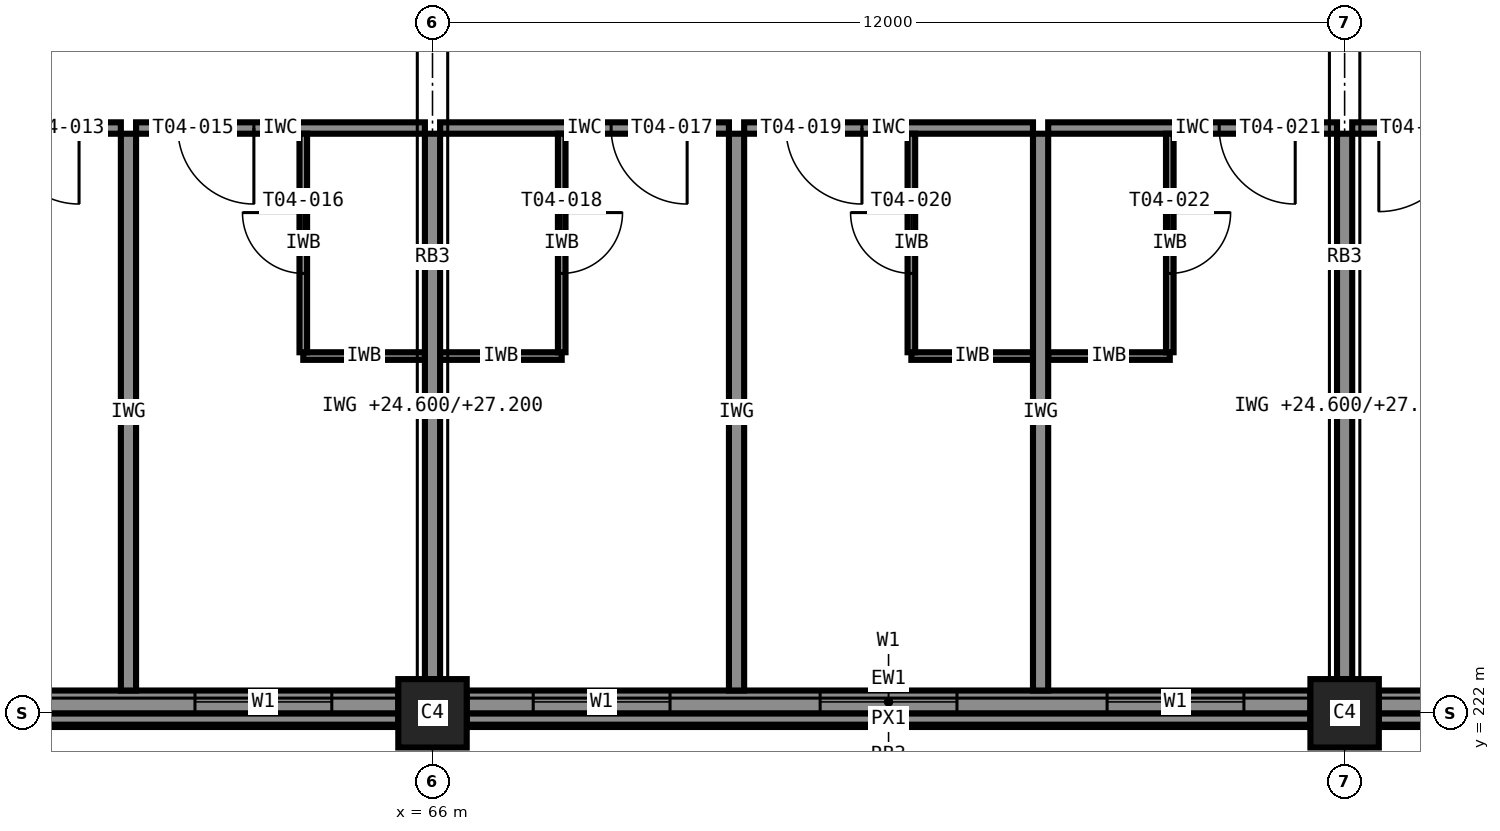
"""IFC4 building model, lengths in metres.
Left out: names, types, materials, properties, quantities, classifications, styles, units other than length and angle.
Written with IfcOpenShell. Run it as: python <this file> out.ifc"""

import sys

from ifc_helpers import new_model, si_unit, direction, frame, frame_2d, origin, origin_2d, place, context, subcontext, project, spatial, rectangle, extrude, element, fill, save


model = new_model("IFC4")
c1 = context("Model", 3, precision=1e-05, world=origin(), true_north=direction((0.0, 1.0)))
c2 = subcontext(c1, "Body", "Model", "MODEL_VIEW")
j1 = project(units=[si_unit("LENGTHUNIT", "METRE"), si_unit("PLANEANGLEUNIT", "RADIAN")], contexts=[c1])
p1 = place(None, origin())
s1 = spatial("IfcSite", under=j1, at=p1, CompositionType="ELEMENT")
p2 = place(p1, origin())
s2 = spatial("IfcBuilding", under=s1, at=p2, CompositionType="ELEMENT")
p3 = place(p2, frame((0.0, 0.0, 24.6)))
s3 = spatial("IfcBuildingStorey", under=s2, at=p3, CompositionType="ELEMENT", Elevation=24.6)
for number, where, z_axis, x_axis in (
    (1, (66.0, 222.0, 0.0), (0.0, 0.0, 1.0), (1.0, 0.0, 0.0)),
    (2, (78.0, 222.0, 0.0), (0.0, 0.0, 1.0), (1.0, 0.0, 0.0)),
):
    element("IfcColumn", number, at=place(p3, frame(where, z_axis=z_axis, x_axis=x_axis)), inside=s3, PredefinedType="COLUMN", context=c2, shape_type="SweptSolid", body=[
        extrude(rectangle(XDim=0.9, YDim=0.9, at=origin_2d()), origin(), (0.0, 0.0, 1.0), 3.6),
    ])
p4 = place(p3, frame((54.45, 222.15, 0.0), z_axis=(0.0, 0.0, 1.0), x_axis=(1.0, 0.0, 0.0)))
e3 = element("IfcWall", 3, at=p4, inside=s3, PredefinedType="STANDARD", context=c2, shape_type="SweptSolid", body=[
    extrude(rectangle(XDim=11.1, YDim=0.3, at=frame_2d((5.55, 0.0))), origin(), (0.0, 0.0, 1.0), 2.6),
])
p5 = place(p4, frame((0.875, 0.0, 0.85)))
e4 = element("IfcOpeningElement", 4, at=p5, cuts=e3, PredefinedType="OPENING", context=c2, shape_type="SweptSolid", body=[
    extrude(rectangle(XDim=1.8, YDim=1.75, at=frame_2d((0.9, 0.875))), frame((0.0, 0.16, 0.0), z_axis=(0.0, -1.0, 0.0), x_axis=(1.0, 0.0, 0.0)), (0.0, 0.0, 1.0), 0.32),
])
p6 = place(p4, frame((4.65, 0.0, 0.85)))
e5 = element("IfcOpeningElement", 5, at=p6, cuts=e3, PredefinedType="OPENING", context=c2, shape_type="SweptSolid", body=[
    extrude(rectangle(XDim=1.8, YDim=1.75, at=frame_2d((0.9, 0.875))), frame((0.0, 0.16, 0.0), z_axis=(0.0, -1.0, 0.0), x_axis=(1.0, 0.0, 0.0)), (0.0, 0.0, 1.0), 0.32),
])
p7 = place(p4, frame((8.425, 0.0, 0.85)))
e6 = element("IfcOpeningElement", 6, at=p7, cuts=e3, PredefinedType="OPENING", context=c2, shape_type="SweptSolid", body=[
    extrude(rectangle(XDim=1.8, YDim=1.75, at=frame_2d((0.9, 0.875))), frame((0.0, 0.16, 0.0), z_axis=(0.0, -1.0, 0.0), x_axis=(1.0, 0.0, 0.0)), (0.0, 0.0, 1.0), 0.32),
])
p8 = place(p3, frame((66.45, 222.15, 0.0), z_axis=(0.0, 0.0, 1.0), x_axis=(1.0, 0.0, 0.0)))
e7 = element("IfcWall", 7, at=p8, inside=s3, PredefinedType="STANDARD", context=c2, shape_type="SweptSolid", body=[
    extrude(rectangle(XDim=11.1, YDim=0.3, at=frame_2d((5.55, 0.0))), origin(), (0.0, 0.0, 1.0), 2.6),
])
p9 = place(p8, frame((0.875, 0.0, 0.85)))
e8 = element("IfcOpeningElement", 8, at=p9, cuts=e7, PredefinedType="OPENING", context=c2, shape_type="SweptSolid", body=[
    extrude(rectangle(XDim=1.8, YDim=1.75, at=frame_2d((0.9, 0.875))), frame((0.0, 0.16, 0.0), z_axis=(0.0, -1.0, 0.0), x_axis=(1.0, 0.0, 0.0)), (0.0, 0.0, 1.0), 0.32),
])
p10 = place(p8, frame((4.65, 0.0, 0.85)))
e9 = element("IfcOpeningElement", 9, at=p10, cuts=e7, PredefinedType="OPENING", context=c2, shape_type="SweptSolid", body=[
    extrude(rectangle(XDim=1.8, YDim=1.75, at=frame_2d((0.9, 0.875))), frame((0.0, 0.16, 0.0), z_axis=(0.0, -1.0, 0.0), x_axis=(1.0, 0.0, 0.0)), (0.0, 0.0, 1.0), 0.32),
])
p11 = place(p8, frame((8.425, 0.0, 0.85)))
e10 = element("IfcOpeningElement", 10, at=p11, cuts=e7, PredefinedType="OPENING", context=c2, shape_type="SweptSolid", body=[
    extrude(rectangle(XDim=1.8, YDim=1.75, at=frame_2d((0.9, 0.875))), frame((0.0, 0.16, 0.0), z_axis=(0.0, -1.0, 0.0), x_axis=(1.0, 0.0, 0.0)), (0.0, 0.0, 1.0), 0.32),
])
p12 = place(p3, frame((78.45, 222.15, 0.0), z_axis=(0.0, 0.0, 1.0), x_axis=(1.0, 0.0, 0.0)))
e11 = element("IfcWall", 11, at=p12, inside=s3, PredefinedType="STANDARD", context=c2, shape_type="SweptSolid", body=[
    extrude(rectangle(XDim=11.1, YDim=0.3, at=frame_2d((5.55, 0.0))), origin(), (0.0, 0.0, 1.0), 2.6),
])
p13 = place(p12, frame((1.075, 0.0, 0.85)))
e12 = element("IfcOpeningElement", 12, at=p13, cuts=e11, PredefinedType="OPENING", context=c2, shape_type="SweptSolid", body=[
    extrude(rectangle(XDim=1.8, YDim=1.75, at=frame_2d((0.9, 0.875))), frame((0.0, 0.16, 0.0), z_axis=(0.0, -1.0, 0.0), x_axis=(1.0, 0.0, 0.0)), (0.0, 0.0, 1.0), 0.32),
])
p14 = place(p12, frame((4.85, 0.0, 0.85)))
e13 = element("IfcOpeningElement", 13, at=p14, cuts=e11, PredefinedType="OPENING", context=c2, shape_type="SweptSolid", body=[
    extrude(rectangle(XDim=1.8, YDim=1.75, at=frame_2d((0.9, 0.875))), frame((0.0, 0.16, 0.0), z_axis=(0.0, -1.0, 0.0), x_axis=(1.0, 0.0, 0.0)), (0.0, 0.0, 1.0), 0.32),
])
for number, where, z_axis, x_axis in (
    (14, (54.45, 221.925, 3.4), (0.0, 0.0, 1.0), (1.0, 0.0, 0.0)),
    (15, (66.45, 221.925, 3.4), (0.0, 0.0, 1.0), (1.0, 0.0, 0.0)),
    (16, (78.45, 221.925, 3.4), (0.0, 0.0, 1.0), (1.0, 0.0, 0.0)),
):
    element("IfcWall", number, at=place(p3, frame(where, z_axis=z_axis, x_axis=x_axis)), inside=s3, PredefinedType="STANDARD", context=c2, shape_type="SweptSolid", body=[
        extrude(rectangle(XDim=11.1, YDim=0.15, at=frame_2d((5.55, 0.0))), origin(), (0.0, 0.0, 1.0), 0.2),
    ])
p15 = place(p3, frame((61.9, 229.7, 0.0), z_axis=(0.0, 0.0, 1.0), x_axis=(-1.0, 0.0, 0.0)))
e17 = element("IfcWall", 17, at=p15, inside=s3, PredefinedType="PARTITIONING", context=c2, shape_type="SweptSolid", body=[
    extrude(rectangle(XDim=3.8, YDim=0.15, at=frame_2d((1.9, 0.0))), origin(), (0.0, 0.0, 1.0), 3.4),
])
p16 = place(p15, frame((0.55, 0.0, 0.0)))
e18 = element("IfcOpeningElement", 18, at=p16, cuts=e17, PredefinedType="OPENING", context=c2, shape_type="SweptSolid", body=[
    extrude(rectangle(XDim=1.0, YDim=2.1, at=frame_2d((0.5, 1.05))), frame((0.0, 0.085, 0.0), z_axis=(0.0, -1.0, 0.0), x_axis=(1.0, 0.0, 0.0)), (0.0, 0.0, 1.0), 0.17),
])
p17 = place(p3, frame((65.9, 229.7, 0.0), z_axis=(0.0, 0.0, 1.0), x_axis=(-1.0, 0.0, 0.0)))
e19 = element("IfcWall", 19, at=p17, inside=s3, PredefinedType="PARTITIONING", context=c2, shape_type="SweptSolid", body=[
    extrude(rectangle(XDim=3.8, YDim=0.15, at=frame_2d((1.9, 0.0))), origin(), (0.0, 0.0, 1.0), 3.4),
])
p18 = place(p17, frame((2.25, 0.0, 0.0)))
e20 = element("IfcOpeningElement", 20, at=p18, cuts=e19, PredefinedType="OPENING", context=c2, shape_type="SweptSolid", body=[
    extrude(rectangle(XDim=1.0, YDim=2.1, at=frame_2d((0.5, 1.05))), frame((0.0, 0.085, 0.0), z_axis=(0.0, -1.0, 0.0), x_axis=(1.0, 0.0, 0.0)), (0.0, 0.0, 1.0), 0.17),
])
p19 = place(p3, frame((64.3, 226.7, 0.0), z_axis=(0.0, 0.0, 1.0), x_axis=(1.0, 0.0, 0.0)))
e21 = element("IfcWall", 21, at=p19, inside=s3, PredefinedType="PARTITIONING", context=c2, shape_type="SweptSolid", body=[
    extrude(rectangle(XDim=1.6, YDim=0.1, at=frame_2d((0.8, 0.0))), origin(), (0.0, 0.0, 1.0), 3.4),
])
p20 = place(p3, frame((64.3, 226.75, 0.0), z_axis=(0.0, 0.0, 1.0), x_axis=(0.0, 1.0, 0.0)))
e22 = element("IfcWall", 22, at=p20, inside=s3, PredefinedType="PARTITIONING", context=c2, shape_type="SweptSolid", body=[
    extrude(rectangle(XDim=2.875, YDim=0.1, at=frame_2d((1.438, 0.0))), origin(), (0.0, 0.0, 1.0), 3.4),
])
p21 = place(p20, frame((1.038, 0.0, 0.0)))
e23 = element("IfcOpeningElement", 23, at=p21, cuts=e22, PredefinedType="OPENING", context=c2, shape_type="SweptSolid", body=[
    extrude(rectangle(XDim=0.8, YDim=2.1, at=frame_2d((0.4, 1.05))), frame((0.0, 0.06, 0.0), z_axis=(0.0, -1.0, 0.0), x_axis=(1.0, 0.0, 0.0)), (0.0, 0.0, 1.0), 0.12),
])
p22 = place(p3, frame((69.9, 229.7, 0.0), z_axis=(0.0, 0.0, 1.0), x_axis=(-1.0, 0.0, 0.0)))
e24 = element("IfcWall", 24, at=p22, inside=s3, PredefinedType="PARTITIONING", context=c2, shape_type="SweptSolid", body=[
    extrude(rectangle(XDim=3.8, YDim=0.15, at=frame_2d((1.9, 0.0))), origin(), (0.0, 0.0, 1.0), 3.4),
])
p23 = place(p22, frame((0.55, 0.0, 0.0)))
e25 = element("IfcOpeningElement", 25, at=p23, cuts=e24, PredefinedType="OPENING", context=c2, shape_type="SweptSolid", body=[
    extrude(rectangle(XDim=1.0, YDim=2.1, at=frame_2d((0.5, 1.05))), frame((0.0, 0.085, 0.0), z_axis=(0.0, -1.0, 0.0), x_axis=(1.0, 0.0, 0.0)), (0.0, 0.0, 1.0), 0.17),
])
p24 = place(p3, frame((66.1, 226.7, 0.0), z_axis=(0.0, 0.0, 1.0), x_axis=(1.0, 0.0, 0.0)))
e26 = element("IfcWall", 26, at=p24, inside=s3, PredefinedType="PARTITIONING", context=c2, shape_type="SweptSolid", body=[
    extrude(rectangle(XDim=1.6, YDim=0.1, at=frame_2d((0.8, 0.0))), origin(), (0.0, 0.0, 1.0), 3.4),
])
p25 = place(p3, frame((67.7, 229.625, 0.0), z_axis=(0.0, 0.0, 1.0), x_axis=(0.0, -1.0, 0.0)))
e27 = element("IfcWall", 27, at=p25, inside=s3, PredefinedType="PARTITIONING", context=c2, shape_type="SweptSolid", body=[
    extrude(rectangle(XDim=2.875, YDim=0.1, at=frame_2d((1.438, 0.0))), origin(), (0.0, 0.0, 1.0), 3.4),
])
p26 = place(p25, frame((1.038, 0.0, 0.0)))
e28 = element("IfcOpeningElement", 28, at=p26, cuts=e27, PredefinedType="OPENING", context=c2, shape_type="SweptSolid", body=[
    extrude(rectangle(XDim=0.8, YDim=2.1, at=frame_2d((0.4, 1.05))), frame((0.0, 0.06, 0.0), z_axis=(0.0, -1.0, 0.0), x_axis=(1.0, 0.0, 0.0)), (0.0, 0.0, 1.0), 0.12),
])
p27 = place(p3, frame((73.9, 229.7, 0.0), z_axis=(0.0, 0.0, 1.0), x_axis=(-1.0, 0.0, 0.0)))
e29 = element("IfcWall", 29, at=p27, inside=s3, PredefinedType="PARTITIONING", context=c2, shape_type="SweptSolid", body=[
    extrude(rectangle(XDim=3.8, YDim=0.15, at=frame_2d((1.9, 0.0))), origin(), (0.0, 0.0, 1.0), 3.4),
])
p28 = place(p27, frame((2.25, 0.0, 0.0)))
e30 = element("IfcOpeningElement", 30, at=p28, cuts=e29, PredefinedType="OPENING", context=c2, shape_type="SweptSolid", body=[
    extrude(rectangle(XDim=1.0, YDim=2.1, at=frame_2d((0.5, 1.05))), frame((0.0, 0.085, 0.0), z_axis=(0.0, -1.0, 0.0), x_axis=(1.0, 0.0, 0.0)), (0.0, 0.0, 1.0), 0.17),
])
p29 = place(p3, frame((72.3, 226.7, 0.0), z_axis=(0.0, 0.0, 1.0), x_axis=(1.0, 0.0, 0.0)))
e31 = element("IfcWall", 31, at=p29, inside=s3, PredefinedType="PARTITIONING", context=c2, shape_type="SweptSolid", body=[
    extrude(rectangle(XDim=1.6, YDim=0.1, at=frame_2d((0.8, 0.0))), origin(), (0.0, 0.0, 1.0), 3.4),
])
p30 = place(p3, frame((72.3, 226.75, 0.0), z_axis=(0.0, 0.0, 1.0), x_axis=(0.0, 1.0, 0.0)))
e32 = element("IfcWall", 32, at=p30, inside=s3, PredefinedType="PARTITIONING", context=c2, shape_type="SweptSolid", body=[
    extrude(rectangle(XDim=2.875, YDim=0.1, at=frame_2d((1.438, 0.0))), origin(), (0.0, 0.0, 1.0), 3.4),
])
p31 = place(p30, frame((1.038, 0.0, 0.0)))
e33 = element("IfcOpeningElement", 33, at=p31, cuts=e32, PredefinedType="OPENING", context=c2, shape_type="SweptSolid", body=[
    extrude(rectangle(XDim=0.8, YDim=2.1, at=frame_2d((0.4, 1.05))), frame((0.0, 0.06, 0.0), z_axis=(0.0, -1.0, 0.0), x_axis=(1.0, 0.0, 0.0)), (0.0, 0.0, 1.0), 0.12),
])
p32 = place(p3, frame((77.9, 229.7, 0.0), z_axis=(0.0, 0.0, 1.0), x_axis=(-1.0, 0.0, 0.0)))
e34 = element("IfcWall", 34, at=p32, inside=s3, PredefinedType="PARTITIONING", context=c2, shape_type="SweptSolid", body=[
    extrude(rectangle(XDim=3.8, YDim=0.15, at=frame_2d((1.9, 0.0))), origin(), (0.0, 0.0, 1.0), 3.4),
])
p33 = place(p32, frame((0.55, 0.0, 0.0)))
e35 = element("IfcOpeningElement", 35, at=p33, cuts=e34, PredefinedType="OPENING", context=c2, shape_type="SweptSolid", body=[
    extrude(rectangle(XDim=1.0, YDim=2.1, at=frame_2d((0.5, 1.05))), frame((0.0, 0.085, 0.0), z_axis=(0.0, -1.0, 0.0), x_axis=(1.0, 0.0, 0.0)), (0.0, 0.0, 1.0), 0.17),
])
p34 = place(p3, frame((74.1, 226.7, 0.0), z_axis=(0.0, 0.0, 1.0), x_axis=(1.0, 0.0, 0.0)))
e36 = element("IfcWall", 36, at=p34, inside=s3, PredefinedType="PARTITIONING", context=c2, shape_type="SweptSolid", body=[
    extrude(rectangle(XDim=1.6, YDim=0.1, at=frame_2d((0.8, 0.0))), origin(), (0.0, 0.0, 1.0), 3.4),
])
p35 = place(p3, frame((75.7, 229.625, 0.0), z_axis=(0.0, 0.0, 1.0), x_axis=(0.0, -1.0, 0.0)))
e37 = element("IfcWall", 37, at=p35, inside=s3, PredefinedType="PARTITIONING", context=c2, shape_type="SweptSolid", body=[
    extrude(rectangle(XDim=2.875, YDim=0.1, at=frame_2d((1.438, 0.0))), origin(), (0.0, 0.0, 1.0), 3.4),
])
p36 = place(p35, frame((1.038, 0.0, 0.0)))
e38 = element("IfcOpeningElement", 38, at=p36, cuts=e37, PredefinedType="OPENING", context=c2, shape_type="SweptSolid", body=[
    extrude(rectangle(XDim=0.8, YDim=2.1, at=frame_2d((0.4, 1.05))), frame((0.0, 0.06, 0.0), z_axis=(0.0, -1.0, 0.0), x_axis=(1.0, 0.0, 0.0)), (0.0, 0.0, 1.0), 0.12),
])
p37 = place(p3, frame((82.3, 229.7, 0.0), z_axis=(0.0, 0.0, 1.0), x_axis=(-1.0, 0.0, 0.0)))
e39 = element("IfcWall", 39, at=p37, inside=s3, PredefinedType="PARTITIONING", context=c2, shape_type="SweptSolid", body=[
    extrude(rectangle(XDim=4.2, YDim=0.15, at=frame_2d((2.1, 0.0))), origin(), (0.0, 0.0, 1.0), 3.4),
])
p38 = place(p37, frame((2.75, 0.0, 0.0)))
e40 = element("IfcOpeningElement", 40, at=p38, cuts=e39, PredefinedType="OPENING", context=c2, shape_type="SweptSolid", body=[
    extrude(rectangle(XDim=1.1, YDim=2.1, at=frame_2d((0.55, 1.05))), frame((0.0, 0.085, 0.0), z_axis=(0.0, -1.0, 0.0), x_axis=(1.0, 0.0, 0.0)), (0.0, 0.0, 1.0), 0.17),
])
p39 = place(p3, frame((62.0, 222.3, 0.0), z_axis=(0.0, 0.0, 1.0), x_axis=(0.0, 1.0, 0.0)))
e41 = element("IfcWall", 41, at=p39, inside=s3, PredefinedType="PARTITIONING", context=c2, shape_type="SweptSolid", body=[
    extrude(rectangle(XDim=7.325, YDim=0.2, at=frame_2d((3.663, 0.0))), origin(), (0.0, 0.0, 1.0), 3.4),
])
p40 = place(p3, frame((66.0, 222.45, 0.0), z_axis=(0.0, 0.0, 1.0), x_axis=(0.0, 1.0, 0.0)))
e42 = element("IfcWall", 42, at=p40, inside=s3, PredefinedType="PARTITIONING", context=c2, shape_type="SweptSolid", body=[
    extrude(rectangle(XDim=7.175, YDim=0.2, at=frame_2d((3.587, 0.0))), origin(), (0.0, 0.0, 1.0), 2.6),
])
for number, where, z_axis, x_axis in (
    (43, (70.0, 222.3, 0.0), (0.0, 0.0, 1.0), (0.0, 1.0, 0.0)),
    (44, (74.0, 222.3, 0.0), (0.0, 0.0, 1.0), (0.0, 1.0, 0.0)),
):
    element("IfcWall", number, at=place(p3, frame(where, z_axis=z_axis, x_axis=x_axis)), inside=s3, PredefinedType="PARTITIONING", context=c2, shape_type="SweptSolid", body=[
        extrude(rectangle(XDim=7.325, YDim=0.2, at=frame_2d((3.663, 0.0))), origin(), (0.0, 0.0, 1.0), 3.4),
    ])
p41 = place(p3, frame((78.0, 222.45, 0.0), z_axis=(0.0, 0.0, 1.0), x_axis=(0.0, 1.0, 0.0)))
e45 = element("IfcWall", 45, at=p41, inside=s3, PredefinedType="PARTITIONING", context=c2, shape_type="SweptSolid", body=[
    extrude(rectangle(XDim=7.175, YDim=0.2, at=frame_2d((3.587, 0.0))), origin(), (0.0, 0.0, 1.0), 2.6),
])
p42 = place(p7, origin())
e46 = element("IfcWindow", 46, at=p42, inside=s3, PartitioningType="SINGLE_PANEL", PredefinedType="WINDOW", context=c2, shape_type="SweptSolid", body=[
    extrude(rectangle(XDim=1.8, YDim=1.75, at=frame_2d((0.9, 0.875))), frame((0.0, 0.03, 0.0), z_axis=(0.0, -1.0, 0.0), x_axis=(1.0, 0.0, 0.0)), (0.0, 0.0, 1.0), 0.06),
])
fill(e6, e46)
p43 = place(p9, origin())
e47 = element("IfcWindow", 47, at=p43, inside=s3, PartitioningType="SINGLE_PANEL", PredefinedType="WINDOW", context=c2, shape_type="SweptSolid", body=[
    extrude(rectangle(XDim=1.8, YDim=1.75, at=frame_2d((0.9, 0.875))), frame((0.0, 0.03, 0.0), z_axis=(0.0, -1.0, 0.0), x_axis=(1.0, 0.0, 0.0)), (0.0, 0.0, 1.0), 0.06),
])
fill(e8, e47)
p44 = place(p10, origin())
e48 = element("IfcWindow", 48, at=p44, inside=s3, PartitioningType="SINGLE_PANEL", PredefinedType="WINDOW", context=c2, shape_type="SweptSolid", body=[
    extrude(rectangle(XDim=1.8, YDim=1.75, at=frame_2d((0.9, 0.875))), frame((0.0, 0.03, 0.0), z_axis=(0.0, -1.0, 0.0), x_axis=(1.0, 0.0, 0.0)), (0.0, 0.0, 1.0), 0.06),
])
fill(e9, e48)
p45 = place(p11, origin())
e49 = element("IfcWindow", 49, at=p45, inside=s3, PartitioningType="SINGLE_PANEL", PredefinedType="WINDOW", context=c2, shape_type="SweptSolid", body=[
    extrude(rectangle(XDim=1.8, YDim=1.75, at=frame_2d((0.9, 0.875))), frame((0.0, 0.03, 0.0), z_axis=(0.0, -1.0, 0.0), x_axis=(1.0, 0.0, 0.0)), (0.0, 0.0, 1.0), 0.06),
])
fill(e10, e49)
p46 = place(p16, origin())
e50 = element("IfcDoor", 50, at=p46, inside=s3, OperationType="SINGLE_SWING_LEFT", PredefinedType="DOOR", context=c2, shape_type="SweptSolid", body=[
    extrude(rectangle(XDim=1.0, YDim=2.1, at=frame_2d((0.5, 1.05))), frame((0.0, 0.025, 0.0), z_axis=(0.0, -1.0, 0.0), x_axis=(1.0, 0.0, 0.0)), (0.0, 0.0, 1.0), 0.05),
])
fill(e18, e50)
p47 = place(p18, origin())
e51 = element("IfcDoor", 51, at=p47, inside=s3, OperationType="SINGLE_SWING_LEFT", PredefinedType="DOOR", context=c2, shape_type="SweptSolid", body=[
    extrude(rectangle(XDim=1.0, YDim=2.1, at=frame_2d((0.5, 1.05))), frame((0.0, 0.025, 0.0), z_axis=(0.0, -1.0, 0.0), x_axis=(1.0, 0.0, 0.0)), (0.0, 0.0, 1.0), 0.05),
])
fill(e20, e51)
p48 = place(p21, origin())
e52 = element("IfcDoor", 52, at=p48, inside=s3, OperationType="SINGLE_SWING_RIGHT", PredefinedType="DOOR", context=c2, shape_type="SweptSolid", body=[
    extrude(rectangle(XDim=0.8, YDim=2.1, at=frame_2d((0.4, 1.05))), frame((0.0, 0.025, 0.0), z_axis=(0.0, -1.0, 0.0), x_axis=(1.0, 0.0, 0.0)), (0.0, 0.0, 1.0), 0.05),
])
fill(e23, e52)
p49 = place(p23, origin())
e53 = element("IfcDoor", 53, at=p49, inside=s3, OperationType="SINGLE_SWING_LEFT", PredefinedType="DOOR", context=c2, shape_type="SweptSolid", body=[
    extrude(rectangle(XDim=1.0, YDim=2.1, at=frame_2d((0.5, 1.05))), frame((0.0, 0.025, 0.0), z_axis=(0.0, -1.0, 0.0), x_axis=(1.0, 0.0, 0.0)), (0.0, 0.0, 1.0), 0.05),
])
fill(e25, e53)
p50 = place(p26, origin())
e54 = element("IfcDoor", 54, at=p50, inside=s3, OperationType="SINGLE_SWING_LEFT", PredefinedType="DOOR", context=c2, shape_type="SweptSolid", body=[
    extrude(rectangle(XDim=0.8, YDim=2.1, at=frame_2d((0.4, 1.05))), frame((0.0, 0.025, 0.0), z_axis=(0.0, -1.0, 0.0), x_axis=(1.0, 0.0, 0.0)), (0.0, 0.0, 1.0), 0.05),
])
fill(e28, e54)
p51 = place(p28, origin())
e55 = element("IfcDoor", 55, at=p51, inside=s3, OperationType="SINGLE_SWING_LEFT", PredefinedType="DOOR", context=c2, shape_type="SweptSolid", body=[
    extrude(rectangle(XDim=1.0, YDim=2.1, at=frame_2d((0.5, 1.05))), frame((0.0, 0.025, 0.0), z_axis=(0.0, -1.0, 0.0), x_axis=(1.0, 0.0, 0.0)), (0.0, 0.0, 1.0), 0.05),
])
fill(e30, e55)
p52 = place(p31, origin())
e56 = element("IfcDoor", 56, at=p52, inside=s3, OperationType="SINGLE_SWING_RIGHT", PredefinedType="DOOR", context=c2, shape_type="SweptSolid", body=[
    extrude(rectangle(XDim=0.8, YDim=2.1, at=frame_2d((0.4, 1.05))), frame((0.0, 0.025, 0.0), z_axis=(0.0, -1.0, 0.0), x_axis=(1.0, 0.0, 0.0)), (0.0, 0.0, 1.0), 0.05),
])
fill(e33, e56)
p53 = place(p33, origin())
e57 = element("IfcDoor", 57, at=p53, inside=s3, OperationType="SINGLE_SWING_LEFT", PredefinedType="DOOR", context=c2, shape_type="SweptSolid", body=[
    extrude(rectangle(XDim=1.0, YDim=2.1, at=frame_2d((0.5, 1.05))), frame((0.0, 0.025, 0.0), z_axis=(0.0, -1.0, 0.0), x_axis=(1.0, 0.0, 0.0)), (0.0, 0.0, 1.0), 0.05),
])
fill(e35, e57)
p54 = place(p36, origin())
e58 = element("IfcDoor", 58, at=p54, inside=s3, OperationType="SINGLE_SWING_LEFT", PredefinedType="DOOR", context=c2, shape_type="SweptSolid", body=[
    extrude(rectangle(XDim=0.8, YDim=2.1, at=frame_2d((0.4, 1.05))), frame((0.0, 0.025, 0.0), z_axis=(0.0, -1.0, 0.0), x_axis=(1.0, 0.0, 0.0)), (0.0, 0.0, 1.0), 0.05),
])
fill(e38, e58)
p55 = place(p38, origin())
e59 = element("IfcDoor", 59, at=p55, inside=s3, OperationType="SINGLE_SWING_RIGHT", PredefinedType="DOOR", context=c2, shape_type="SweptSolid", body=[
    extrude(rectangle(XDim=1.1, YDim=2.1, at=frame_2d((0.55, 1.05))), frame((0.0, 0.025, 0.0), z_axis=(0.0, -1.0, 0.0), x_axis=(1.0, 0.0, 0.0)), (0.0, 0.0, 1.0), 0.05),
])
fill(e40, e59)
save(model, sys.argv[1])
